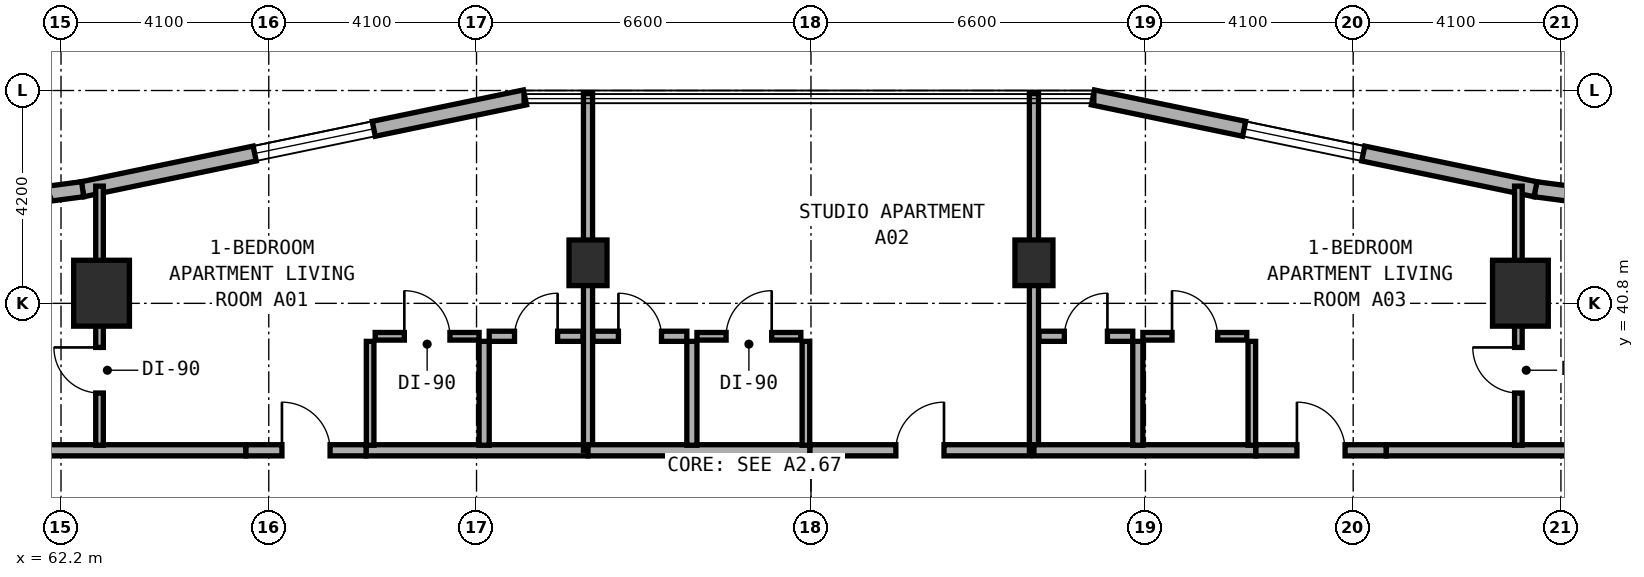
"""IFC4 building model, lengths in metres.
Left out: names, types, materials, properties, quantities, classifications, styles, units other than length and angle.
Written with IfcOpenShell. Run it as: python <this file> out.ifc"""

import sys

from ifc_helpers import new_model, si_unit, direction, frame, frame_2d, origin, origin_2d, place, context, subcontext, project, spatial, rectangle, extrude, element, fill, save


model = new_model("IFC4")
c1 = context("Model", 3, precision=1e-05, world=origin(), true_north=direction((0.0, 1.0)))
c2 = subcontext(c1, "Body", "Model", "MODEL_VIEW")
j1 = project(units=[si_unit("LENGTHUNIT", "METRE"), si_unit("PLANEANGLEUNIT", "RADIAN")], contexts=[c1])
p1 = place(None, origin())
s1 = spatial("IfcSite", under=j1, at=p1, CompositionType="ELEMENT")
p2 = place(p1, origin())
s2 = spatial("IfcBuilding", under=s1, at=p2, CompositionType="ELEMENT")
p3 = place(p2, frame((0.0, 0.0, 31.0)))
s3 = spatial("IfcBuildingStorey", under=s2, at=p3, CompositionType="ELEMENT", Elevation=31.0)
for number, where, z_axis, x_axis in (
    (1, (72.6, 41.6, 0.0), (0.0, 0.0, 1.0), (1.0, 0.0, 0.0)),
    (2, (81.4, 41.6, 0.0), (0.0, 0.0, 1.0), (1.0, 0.0, 0.0)),
):
    element("IfcColumn", number, at=place(p3, frame(where, z_axis=z_axis, x_axis=x_axis)), inside=s3, PredefinedType="COLUMN", context=c2, shape_type="SweptSolid", body=[
        extrude(rectangle(XDim=0.75, YDim=0.9, at=origin_2d()), origin(), (0.0, 0.0, 1.0), 3.5),
    ])
for number, where, z_axis, x_axis in (
    (3, (91.0, 41.0, 0.0), (0.0, 0.0, 1.0), (1.0, 0.0, 0.0)),
    (4, (63.0, 41.0, 0.0), (0.0, 0.0, 1.0), (1.0, 0.0, 0.0)),
):
    element("IfcColumn", number, at=place(p3, frame(where, z_axis=z_axis, x_axis=x_axis)), inside=s3, PredefinedType="COLUMN", context=c2, shape_type="SweptSolid", body=[
        extrude(rectangle(XDim=1.1, YDim=1.3, at=origin_2d()), origin(), (0.0, 0.0, 1.0), 3.5),
    ])
p4 = place(p3, frame((92.051, 42.953, 0.0), z_axis=(0.0, 0.0, 1.0), x_axis=(-0.991559404866, 0.129653178221, 0.0)))
e5 = element("IfcWall", 5, at=p4, inside=s3, PredefinedType="STANDARD", context=c2, shape_type="SweptSolid", body=[
    extrude(rectangle(XDim=0.764, YDim=0.3, at=frame_2d((0.382, 0.0))), origin(), (0.0, 0.0, 1.0), 3.25),
])
p5 = place(p3, frame((91.298, 43.051, 0.0), z_axis=(0.0, 0.0, 1.0), x_axis=(-0.979128391325, 0.203242695569, 0.0)))
e6 = element("IfcWall", 6, at=p5, inside=s3, PredefinedType="STANDARD", context=c2, shape_type="SweptSolid", body=[
    extrude(rectangle(XDim=8.92, YDim=0.3, at=frame_2d((4.46, 0.0))), origin(), (0.0, 0.0, 1.0), 3.25),
])
p6 = place(p5, frame((3.472, 0.0, 0.8)))
e7 = element("IfcOpeningElement", 7, at=p6, cuts=e6, PredefinedType="OPENING", context=c2, shape_type="SweptSolid", body=[
    extrude(rectangle(XDim=2.4, YDim=1.6, at=frame_2d((1.2, 0.8))), frame((0.0, 0.16, 0.0), z_axis=(0.0, -1.0, 0.0), x_axis=(1.0, 0.0, 0.0)), (0.0, 0.0, 1.0), 0.32),
])
p7 = place(p3, frame((71.356, 44.864, 0.0), z_axis=(0.0, 0.0, 1.0), x_axis=(-0.979127260729, -0.203248142175, 0.0)))
e8 = element("IfcWall", 8, at=p7, inside=s3, PredefinedType="STANDARD", context=c2, shape_type="SweptSolid", body=[
    extrude(rectangle(XDim=8.92, YDim=0.3, at=frame_2d((4.46, 0.0))), origin(), (0.0, 0.0, 1.0), 3.25),
])
p8 = place(p7, frame((3.048, 0.0, 0.8)))
e9 = element("IfcOpeningElement", 9, at=p8, cuts=e8, PredefinedType="OPENING", context=c2, shape_type="SweptSolid", body=[
    extrude(rectangle(XDim=2.4, YDim=1.6, at=frame_2d((1.2, 0.8))), frame((0.0, 0.16, 0.0), z_axis=(0.0, -1.0, 0.0), x_axis=(1.0, 0.0, 0.0)), (0.0, 0.0, 1.0), 0.32),
])
p9 = place(p3, frame((62.627, 43.052, 0.0), z_axis=(0.0, 0.0, 1.0), x_axis=(-0.991480488834, -0.130255288807, 0.0)))
e10 = element("IfcWall", 10, at=p9, inside=s3, PredefinedType="STANDARD", context=c2, shape_type="SweptSolid", body=[
    extrude(rectangle(XDim=0.729, YDim=0.3, at=frame_2d((0.365, 0.0))), origin(), (0.0, 0.0, 1.0), 3.25),
])
p10 = place(p3, frame((58.16, 37.9, 0.0), z_axis=(0.0, 0.0, 1.0), x_axis=(1.0, 0.0, 0.0)))
e11 = element("IfcWall", 11, at=p10, inside=s3, PredefinedType="SOLIDWALL", context=c2, shape_type="SweptSolid", body=[
    extrude(rectangle(XDim=7.69, YDim=0.22, at=frame_2d((3.845, 0.0))), origin(), (0.0, 0.0, 1.0), 2.865),
])
p11 = place(p3, frame((68.22, 37.9, 0.0), z_axis=(0.0, 0.0, 1.0), x_axis=(1.0, 0.0, 0.0)))
e12 = element("IfcWall", 12, at=p11, inside=s3, PredefinedType="SOLIDWALL", context=c2, shape_type="SweptSolid", body=[
    extrude(rectangle(XDim=4.38, YDim=0.22, at=frame_2d((2.19, 0.0))), origin(), (0.0, 0.0, 1.0), 2.725),
])
p12 = place(p3, frame((65.85, 37.9, 0.0), z_axis=(0.0, 0.0, 1.0), x_axis=(1.0, 0.0, 0.0)))
e13 = element("IfcWall", 13, at=p12, inside=s3, PredefinedType="SOLIDWALL", context=c2, shape_type="SweptSolid", body=[
    extrude(rectangle(XDim=2.37, YDim=0.22, at=frame_2d((1.185, 0.0))), origin(), (0.0, 0.0, 1.0), 3.22),
])
p13 = place(p12, frame((0.71, 0.0, 0.0)))
e14 = element("IfcOpeningElement", 14, at=p13, cuts=e13, PredefinedType="OPENING", context=c2, shape_type="SweptSolid", body=[
    extrude(rectangle(XDim=0.95, YDim=2.1, at=frame_2d((0.475, 1.05))), frame((0.0, 0.12, 0.0), z_axis=(0.0, -1.0, 0.0), x_axis=(1.0, 0.0, 0.0)), (0.0, 0.0, 1.0), 0.24),
])
p14 = place(p3, frame((62.96, 38.0, 0.0), z_axis=(0.0, 0.0, 1.0), x_axis=(0.0, 1.0, 0.0)))
e15 = element("IfcWall", 15, at=p14, inside=s3, PredefinedType="PARTITIONING", context=c2, shape_type="SweptSolid", body=[
    extrude(rectangle(XDim=5.113, YDim=0.15, at=frame_2d((2.557, 0.0))), origin(), (0.0, 0.0, 1.0), 2.865),
])
p15 = place(p14, frame((1.03, 0.0, 0.0)))
e16 = element("IfcOpeningElement", 16, at=p15, cuts=e15, PredefinedType="OPENING", context=c2, shape_type="SweptSolid", body=[
    extrude(rectangle(XDim=0.9, YDim=2.1, at=frame_2d((0.45, 1.05))), frame((0.0, 0.085, 0.0), z_axis=(0.0, -1.0, 0.0), x_axis=(1.0, 0.0, 0.0)), (0.0, 0.0, 1.0), 0.17),
])
p16 = place(p3, frame((70.55, 38.0, 0.0), z_axis=(0.0, 0.0, 1.0), x_axis=(0.0, 1.0, 0.0)))
e17 = element("IfcWall", 17, at=p16, inside=s3, PredefinedType="PLUMBINGWALL", context=c2, shape_type="SweptSolid", body=[
    extrude(rectangle(XDim=2.05, YDim=0.2, at=frame_2d((1.025, 0.0))), origin(), (0.0, 0.0, 1.0), 3.22),
])
p17 = place(p3, frame((68.3, 38.0, 0.0), z_axis=(0.0, 0.0, 1.0), x_axis=(0.0, 1.0, 0.0)))
e18 = element("IfcWall", 18, at=p17, inside=s3, PredefinedType="PARTITIONING", context=c2, shape_type="SweptSolid", body=[
    extrude(rectangle(XDim=2.05, YDim=0.15, at=frame_2d((1.025, 0.0))), origin(), (0.0, 0.0, 1.0), 3.22),
])
p18 = place(p3, frame((70.65, 40.15, 0.0), z_axis=(0.0, 0.0, 1.0), x_axis=(1.0, 0.0, 0.0)))
e19 = element("IfcWall", 19, at=p18, inside=s3, PredefinedType="PLUMBINGWALL", context=c2, shape_type="SweptSolid", body=[
    extrude(rectangle(XDim=1.85, YDim=0.2, at=frame_2d((0.925, 0.0))), origin(), (0.0, 0.0, 1.0), 3.22),
])
p19 = place(p18, frame((0.5, 0.0, 0.0)))
e20 = element("IfcOpeningElement", 20, at=p19, cuts=e19, PredefinedType="OPENING", context=c2, shape_type="SweptSolid", body=[
    extrude(rectangle(XDim=0.85, YDim=2.1, at=frame_2d((0.425, 1.05))), frame((0.0, 0.11, 0.0), z_axis=(0.0, -1.0, 0.0), x_axis=(1.0, 0.0, 0.0)), (0.0, 0.0, 1.0), 0.22),
])
p20 = place(p3, frame((68.4, 40.15, 0.0), z_axis=(0.0, 0.0, 1.0), x_axis=(1.0, 0.0, 0.0)))
e21 = element("IfcWall", 21, at=p20, inside=s3, PredefinedType="PARTITIONING", context=c2, shape_type="SweptSolid", body=[
    extrude(rectangle(XDim=2.05, YDim=0.15, at=frame_2d((1.025, 0.0))), origin(), (0.0, 0.0, 1.0), 3.22),
])
p21 = place(p20, frame((0.575, 0.0, 0.0)))
e22 = element("IfcOpeningElement", 22, at=p21, cuts=e21, PredefinedType="OPENING", context=c2, shape_type="SweptSolid", body=[
    extrude(rectangle(XDim=0.9, YDim=2.1, at=frame_2d((0.45, 1.05))), frame((0.0, 0.085, 0.0), z_axis=(0.0, -1.0, 0.0), x_axis=(1.0, 0.0, 0.0)), (0.0, 0.0, 1.0), 0.17),
])
p22 = place(p3, frame((72.6, 37.9, 0.0), z_axis=(0.0, 0.0, 1.0), x_axis=(0.0, 1.0, 0.0)))
e23 = element("IfcWall", 23, at=p22, inside=s3, PredefinedType="SOLIDWALL", context=c2, shape_type="SweptSolid", body=[
    extrude(rectangle(XDim=7.04, YDim=0.18, at=frame_2d((3.52, 0.0))), origin(), (0.0, 0.0, 1.0), 2.725),
])
p23 = place(p3, frame((72.6, 37.9, 0.0), z_axis=(0.0, 0.0, 1.0), x_axis=(1.0, 0.0, 0.0)))
e24 = element("IfcWall", 24, at=p23, inside=s3, PredefinedType="SOLIDWALL", context=c2, shape_type="SweptSolid", body=[
    extrude(rectangle(XDim=4.38, YDim=0.22, at=frame_2d((2.19, 0.0))), origin(), (0.0, 0.0, 1.0), 2.725),
])
p24 = place(p3, frame((76.98, 37.9, 0.0), z_axis=(0.0, 0.0, 1.0), x_axis=(1.0, 0.0, 0.0)))
e25 = element("IfcWall", 25, at=p24, inside=s3, PredefinedType="SOLIDWALL", context=c2, shape_type="SweptSolid", body=[
    extrude(rectangle(XDim=4.34, YDim=0.22, at=frame_2d((2.17, 0.0))), origin(), (0.0, 0.0, 1.0), 2.725),
])
p25 = place(p24, frame((1.695, 0.0, 0.0)))
e26 = element("IfcOpeningElement", 26, at=p25, cuts=e25, PredefinedType="OPENING", context=c2, shape_type="SweptSolid", body=[
    extrude(rectangle(XDim=0.95, YDim=2.1, at=frame_2d((0.475, 1.05))), frame((0.0, 0.12, 0.0), z_axis=(0.0, -1.0, 0.0), x_axis=(1.0, 0.0, 0.0)), (0.0, 0.0, 1.0), 0.24),
])
p26 = place(p3, frame((74.65, 38.0, 0.0), z_axis=(0.0, 0.0, 1.0), x_axis=(0.0, 1.0, 0.0)))
e27 = element("IfcWall", 27, at=p26, inside=s3, PredefinedType="PLUMBINGWALL", context=c2, shape_type="SweptSolid", body=[
    extrude(rectangle(XDim=2.05, YDim=0.2, at=frame_2d((1.025, 0.0))), origin(), (0.0, 0.0, 1.0), 2.825),
])
p27 = place(p3, frame((76.9, 38.0, 0.0), z_axis=(0.0, 0.0, 1.0), x_axis=(0.0, 1.0, 0.0)))
e28 = element("IfcWall", 28, at=p27, inside=s3, PredefinedType="PARTITIONING", context=c2, shape_type="SweptSolid", body=[
    extrude(rectangle(XDim=2.05, YDim=0.15, at=frame_2d((1.025, 0.0))), origin(), (0.0, 0.0, 1.0), 2.825),
])
p28 = place(p3, frame((72.7, 40.15, 0.0), z_axis=(0.0, 0.0, 1.0), x_axis=(1.0, 0.0, 0.0)))
e29 = element("IfcWall", 29, at=p28, inside=s3, PredefinedType="PLUMBINGWALL", context=c2, shape_type="SweptSolid", body=[
    extrude(rectangle(XDim=1.85, YDim=0.2, at=frame_2d((0.925, 0.0))), origin(), (0.0, 0.0, 1.0), 3.22),
])
p29 = place(p28, frame((0.5, 0.0, 0.0)))
e30 = element("IfcOpeningElement", 30, at=p29, cuts=e29, PredefinedType="OPENING", context=c2, shape_type="SweptSolid", body=[
    extrude(rectangle(XDim=0.85, YDim=2.1, at=frame_2d((0.425, 1.05))), frame((0.0, 0.11, 0.0), z_axis=(0.0, -1.0, 0.0), x_axis=(1.0, 0.0, 0.0)), (0.0, 0.0, 1.0), 0.22),
])
p30 = place(p3, frame((74.75, 40.15, 0.0), z_axis=(0.0, 0.0, 1.0), x_axis=(1.0, 0.0, 0.0)))
e31 = element("IfcWall", 31, at=p30, inside=s3, PredefinedType="PARTITIONING", context=c2, shape_type="SweptSolid", body=[
    extrude(rectangle(XDim=2.05, YDim=0.15, at=frame_2d((1.025, 0.0))), origin(), (0.0, 0.0, 1.0), 3.22),
])
p31 = place(p30, frame((0.575, 0.0, 0.0)))
e32 = element("IfcOpeningElement", 32, at=p31, cuts=e31, PredefinedType="OPENING", context=c2, shape_type="SweptSolid", body=[
    extrude(rectangle(XDim=0.9, YDim=2.1, at=frame_2d((0.45, 1.05))), frame((0.0, 0.085, 0.0), z_axis=(0.0, -1.0, 0.0), x_axis=(1.0, 0.0, 0.0)), (0.0, 0.0, 1.0), 0.17),
])
p32 = place(p3, frame((81.4, 37.9, 0.0), z_axis=(0.0, 0.0, 1.0), x_axis=(0.0, 1.0, 0.0)))
e33 = element("IfcWall", 33, at=p32, inside=s3, PredefinedType="SOLIDWALL", context=c2, shape_type="SweptSolid", body=[
    extrude(rectangle(XDim=7.04, YDim=0.18, at=frame_2d((3.52, 0.0))), origin(), (0.0, 0.0, 1.0), 2.725),
])
p33 = place(p3, frame((81.4, 37.9, 0.0), z_axis=(0.0, 0.0, 1.0), x_axis=(1.0, 0.0, 0.0)))
e34 = element("IfcWall", 34, at=p33, inside=s3, PredefinedType="SOLIDWALL", context=c2, shape_type="SweptSolid", body=[
    extrude(rectangle(XDim=4.38, YDim=0.22, at=frame_2d((2.19, 0.0))), origin(), (0.0, 0.0, 1.0), 2.725),
])
p34 = place(p3, frame((88.35, 37.9, 0.0), z_axis=(0.0, 0.0, 1.0), x_axis=(1.0, 0.0, 0.0)))
e35 = element("IfcWall", 35, at=p34, inside=s3, PredefinedType="SOLIDWALL", context=c2, shape_type="SweptSolid", body=[
    extrude(rectangle(XDim=7.41, YDim=0.22, at=frame_2d((3.705, 0.0))), origin(), (0.0, 0.0, 1.0), 2.865),
])
p35 = place(p3, frame((85.78, 37.9, 0.0), z_axis=(0.0, 0.0, 1.0), x_axis=(1.0, 0.0, 0.0)))
e36 = element("IfcWall", 36, at=p35, inside=s3, PredefinedType="SOLIDWALL", context=c2, shape_type="SweptSolid", body=[
    extrude(rectangle(XDim=2.57, YDim=0.22, at=frame_2d((1.285, 0.0))), origin(), (0.0, 0.0, 1.0), 3.22),
])
p36 = place(p35, frame((0.81, 0.0, 0.0)))
e37 = element("IfcOpeningElement", 37, at=p36, cuts=e36, PredefinedType="OPENING", context=c2, shape_type="SweptSolid", body=[
    extrude(rectangle(XDim=0.95, YDim=2.1, at=frame_2d((0.475, 1.05))), frame((0.0, 0.12, 0.0), z_axis=(0.0, -1.0, 0.0), x_axis=(1.0, 0.0, 0.0)), (0.0, 0.0, 1.0), 0.24),
])
p37 = place(p3, frame((90.96, 38.0, 0.0), z_axis=(0.0, 0.0, 1.0), x_axis=(0.0, 1.0, 0.0)))
e38 = element("IfcWall", 38, at=p37, inside=s3, PredefinedType="PARTITIONING", context=c2, shape_type="SweptSolid", body=[
    extrude(rectangle(XDim=5.113, YDim=0.15, at=frame_2d((2.557, 0.0))), origin(), (0.0, 0.0, 1.0), 2.865),
])
p38 = place(p37, frame((1.03, 0.0, 0.0)))
e39 = element("IfcOpeningElement", 39, at=p38, cuts=e38, PredefinedType="OPENING", context=c2, shape_type="SweptSolid", body=[
    extrude(rectangle(XDim=0.9, YDim=2.1, at=frame_2d((0.45, 1.05))), frame((0.0, 0.085, 0.0), z_axis=(0.0, -1.0, 0.0), x_axis=(1.0, 0.0, 0.0)), (0.0, 0.0, 1.0), 0.17),
])
p39 = place(p3, frame((83.45, 38.0, 0.0), z_axis=(0.0, 0.0, 1.0), x_axis=(0.0, 1.0, 0.0)))
e40 = element("IfcWall", 40, at=p39, inside=s3, PredefinedType="PLUMBINGWALL", context=c2, shape_type="SweptSolid", body=[
    extrude(rectangle(XDim=2.05, YDim=0.2, at=frame_2d((1.025, 0.0))), origin(), (0.0, 0.0, 1.0), 3.22),
])
p40 = place(p3, frame((85.7, 38.0, 0.0), z_axis=(0.0, 0.0, 1.0), x_axis=(0.0, 1.0, 0.0)))
e41 = element("IfcWall", 41, at=p40, inside=s3, PredefinedType="PARTITIONING", context=c2, shape_type="SweptSolid", body=[
    extrude(rectangle(XDim=2.05, YDim=0.15, at=frame_2d((1.025, 0.0))), origin(), (0.0, 0.0, 1.0), 3.22),
])
p41 = place(p3, frame((81.5, 40.15, 0.0), z_axis=(0.0, 0.0, 1.0), x_axis=(1.0, 0.0, 0.0)))
e42 = element("IfcWall", 42, at=p41, inside=s3, PredefinedType="PLUMBINGWALL", context=c2, shape_type="SweptSolid", body=[
    extrude(rectangle(XDim=1.85, YDim=0.2, at=frame_2d((0.925, 0.0))), origin(), (0.0, 0.0, 1.0), 2.725),
])
p42 = place(p41, frame((0.5, 0.0, 0.0)))
e43 = element("IfcOpeningElement", 43, at=p42, cuts=e42, PredefinedType="OPENING", context=c2, shape_type="SweptSolid", body=[
    extrude(rectangle(XDim=0.85, YDim=2.1, at=frame_2d((0.425, 1.05))), frame((0.0, 0.11, 0.0), z_axis=(0.0, -1.0, 0.0), x_axis=(1.0, 0.0, 0.0)), (0.0, 0.0, 1.0), 0.22),
])
p43 = place(p3, frame((83.55, 40.15, 0.0), z_axis=(0.0, 0.0, 1.0), x_axis=(1.0, 0.0, 0.0)))
e44 = element("IfcWall", 44, at=p43, inside=s3, PredefinedType="PARTITIONING", context=c2, shape_type="SweptSolid", body=[
    extrude(rectangle(XDim=2.05, YDim=0.15, at=frame_2d((1.025, 0.0))), origin(), (0.0, 0.0, 1.0), 3.22),
])
p44 = place(p43, frame((0.575, 0.0, 0.0)))
e45 = element("IfcOpeningElement", 45, at=p44, cuts=e44, PredefinedType="OPENING", context=c2, shape_type="SweptSolid", body=[
    extrude(rectangle(XDim=0.9, YDim=2.1, at=frame_2d((0.45, 1.05))), frame((0.0, 0.085, 0.0), z_axis=(0.0, -1.0, 0.0), x_axis=(1.0, 0.0, 0.0)), (0.0, 0.0, 1.0), 0.17),
])
p45 = place(p6, origin())
e46 = element("IfcWindow", 46, at=p45, inside=s3, PartitioningType="SINGLE_PANEL", PredefinedType="WINDOW", context=c2, shape_type="SweptSolid", body=[
    extrude(rectangle(XDim=2.4, YDim=1.6, at=frame_2d((1.2, 0.8))), frame((0.0, 0.03, 0.0), z_axis=(0.0, -1.0, 0.0), x_axis=(1.0, 0.0, 0.0)), (0.0, 0.0, 1.0), 0.06),
])
fill(e7, e46)
p46 = place(p8, origin())
e47 = element("IfcWindow", 47, at=p46, inside=s3, PartitioningType="SINGLE_PANEL", PredefinedType="WINDOW", context=c2, shape_type="SweptSolid", body=[
    extrude(rectangle(XDim=2.4, YDim=1.6, at=frame_2d((1.2, 0.8))), frame((0.0, 0.03, 0.0), z_axis=(0.0, -1.0, 0.0), x_axis=(1.0, 0.0, 0.0)), (0.0, 0.0, 1.0), 0.06),
])
fill(e9, e47)
p47 = place(p13, origin())
e48 = element("IfcDoor", 48, at=p47, inside=s3, OperationType="SINGLE_SWING_LEFT", PredefinedType="DOOR", context=c2, shape_type="SweptSolid", body=[
    extrude(rectangle(XDim=0.95, YDim=2.1, at=frame_2d((0.475, 1.05))), frame((0.0, 0.025, 0.0), z_axis=(0.0, -1.0, 0.0), x_axis=(1.0, 0.0, 0.0)), (0.0, 0.0, 1.0), 0.05),
])
fill(e14, e48)
p48 = place(p15, origin())
e49 = element("IfcDoor", 49, at=p48, inside=s3, OperationType="SINGLE_SWING_RIGHT", PredefinedType="DOOR", context=c2, shape_type="SweptSolid", body=[
    extrude(rectangle(XDim=0.9, YDim=2.1, at=frame_2d((0.45, 1.05))), frame((0.0, 0.025, 0.0), z_axis=(0.0, -1.0, 0.0), x_axis=(1.0, 0.0, 0.0)), (0.0, 0.0, 1.0), 0.05),
])
fill(e16, e49)
p49 = place(p19, origin())
e50 = element("IfcDoor", 50, at=p49, inside=s3, OperationType="SINGLE_SWING_RIGHT", PredefinedType="DOOR", context=c2, shape_type="SweptSolid", body=[
    extrude(rectangle(XDim=0.85, YDim=2.1, at=frame_2d((0.425, 1.05))), frame((0.0, 0.025, 0.0), z_axis=(0.0, -1.0, 0.0), x_axis=(1.0, 0.0, 0.0)), (0.0, 0.0, 1.0), 0.05),
])
fill(e20, e50)
p50 = place(p21, origin())
e51 = element("IfcDoor", 51, at=p50, inside=s3, OperationType="SINGLE_SWING_LEFT", PredefinedType="DOOR", context=c2, shape_type="SweptSolid", body=[
    extrude(rectangle(XDim=0.9, YDim=2.1, at=frame_2d((0.45, 1.05))), frame((0.0, 0.025, 0.0), z_axis=(0.0, -1.0, 0.0), x_axis=(1.0, 0.0, 0.0)), (0.0, 0.0, 1.0), 0.05),
])
fill(e22, e51)
p51 = place(p25, origin())
e52 = element("IfcDoor", 52, at=p51, inside=s3, OperationType="SINGLE_SWING_RIGHT", PredefinedType="DOOR", context=c2, shape_type="SweptSolid", body=[
    extrude(rectangle(XDim=0.95, YDim=2.1, at=frame_2d((0.475, 1.05))), frame((0.0, 0.025, 0.0), z_axis=(0.0, -1.0, 0.0), x_axis=(1.0, 0.0, 0.0)), (0.0, 0.0, 1.0), 0.05),
])
fill(e26, e52)
p52 = place(p29, origin())
e53 = element("IfcDoor", 53, at=p52, inside=s3, OperationType="SINGLE_SWING_LEFT", PredefinedType="DOOR", context=c2, shape_type="SweptSolid", body=[
    extrude(rectangle(XDim=0.85, YDim=2.1, at=frame_2d((0.425, 1.05))), frame((0.0, 0.025, 0.0), z_axis=(0.0, -1.0, 0.0), x_axis=(1.0, 0.0, 0.0)), (0.0, 0.0, 1.0), 0.05),
])
fill(e30, e53)
p53 = place(p31, origin())
e54 = element("IfcDoor", 54, at=p53, inside=s3, OperationType="SINGLE_SWING_RIGHT", PredefinedType="DOOR", context=c2, shape_type="SweptSolid", body=[
    extrude(rectangle(XDim=0.9, YDim=2.1, at=frame_2d((0.45, 1.05))), frame((0.0, 0.025, 0.0), z_axis=(0.0, -1.0, 0.0), x_axis=(1.0, 0.0, 0.0)), (0.0, 0.0, 1.0), 0.05),
])
fill(e32, e54)
p54 = place(p36, origin())
e55 = element("IfcDoor", 55, at=p54, inside=s3, OperationType="SINGLE_SWING_LEFT", PredefinedType="DOOR", context=c2, shape_type="SweptSolid", body=[
    extrude(rectangle(XDim=0.95, YDim=2.1, at=frame_2d((0.475, 1.05))), frame((0.0, 0.025, 0.0), z_axis=(0.0, -1.0, 0.0), x_axis=(1.0, 0.0, 0.0)), (0.0, 0.0, 1.0), 0.05),
])
fill(e37, e55)
p55 = place(p38, origin())
e56 = element("IfcDoor", 56, at=p55, inside=s3, OperationType="SINGLE_SWING_RIGHT", PredefinedType="DOOR", context=c2, shape_type="SweptSolid", body=[
    extrude(rectangle(XDim=0.9, YDim=2.1, at=frame_2d((0.45, 1.05))), frame((0.0, 0.025, 0.0), z_axis=(0.0, -1.0, 0.0), x_axis=(1.0, 0.0, 0.0)), (0.0, 0.0, 1.0), 0.05),
])
fill(e39, e56)
p56 = place(p42, origin())
e57 = element("IfcDoor", 57, at=p56, inside=s3, OperationType="SINGLE_SWING_RIGHT", PredefinedType="DOOR", context=c2, shape_type="SweptSolid", body=[
    extrude(rectangle(XDim=0.85, YDim=2.1, at=frame_2d((0.425, 1.05))), frame((0.0, 0.025, 0.0), z_axis=(0.0, -1.0, 0.0), x_axis=(1.0, 0.0, 0.0)), (0.0, 0.0, 1.0), 0.05),
])
fill(e43, e57)
p57 = place(p44, origin())
e58 = element("IfcDoor", 58, at=p57, inside=s3, OperationType="SINGLE_SWING_LEFT", PredefinedType="DOOR", context=c2, shape_type="SweptSolid", body=[
    extrude(rectangle(XDim=0.9, YDim=2.1, at=frame_2d((0.45, 1.05))), frame((0.0, 0.025, 0.0), z_axis=(0.0, -1.0, 0.0), x_axis=(1.0, 0.0, 0.0)), (0.0, 0.0, 1.0), 0.05),
])
fill(e45, e58)
save(model, sys.argv[1])
